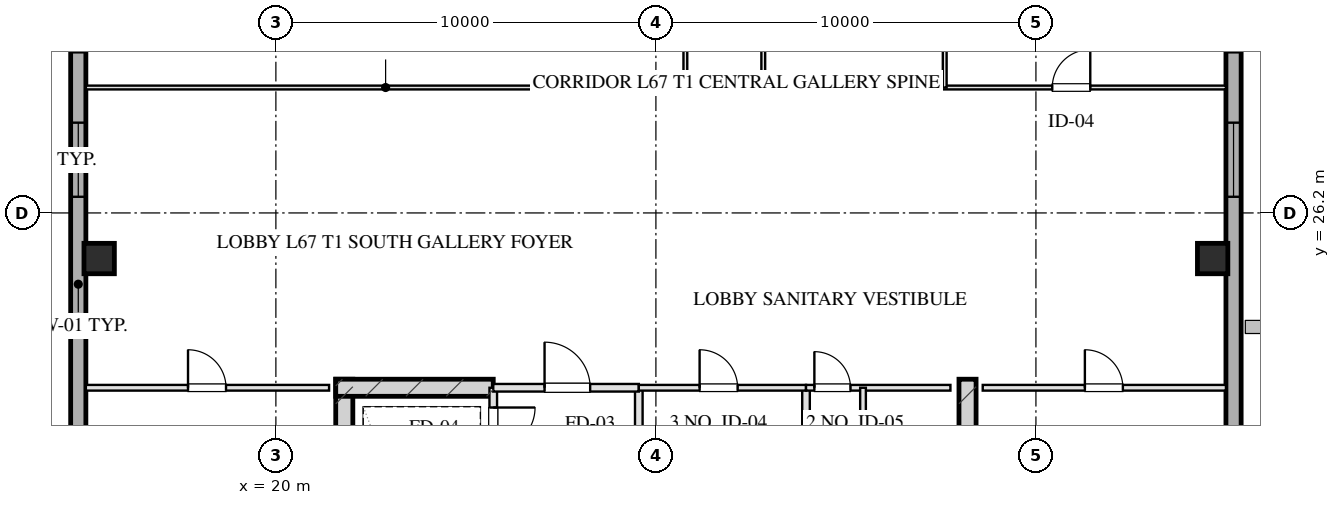
"""IFC4 building model, lengths in metres.
Left out: names, types, materials, properties, quantities, classifications, styles, units other than length and angle.
Written with IfcOpenShell. Run it as: python <this file> out.ifc"""

import sys

from ifc_helpers import new_model, si_unit, direction, frame, frame_2d, origin, origin_2d, place, context, subcontext, project, spatial, rectangle, hollow_rectangle, extrude, element, fill, save


model = new_model("IFC4")
c1 = context("Model", 3, precision=1e-05, world=origin(), true_north=direction((0.0, 1.0)))
c2 = subcontext(c1, "Body", "Model", "MODEL_VIEW")
j1 = project(units=[si_unit("LENGTHUNIT", "METRE"), si_unit("PLANEANGLEUNIT", "RADIAN")], contexts=[c1])
p1 = place(None, origin())
s1 = spatial("IfcSite", under=j1, at=p1, CompositionType="ELEMENT")
p2 = place(p1, origin())
s2 = spatial("IfcBuilding", under=s1, at=p2, CompositionType="ELEMENT")
p3 = place(p2, frame((0.0, 0.0, 247.2)))
s3 = spatial("IfcBuildingStorey", under=s2, at=p3, CompositionType="ELEMENT", Elevation=247.2)
for number, where, z_axis, x_axis in (
    (1, (21.8, 21.825, 0.0), (0.0, 0.0, 1.0), (0.0, -1.0, 0.0)),
    (2, (38.2, 21.825, 0.0), (0.0, 0.0, 1.0), (0.0, -1.0, 0.0)),
):
    element("IfcWall", number, at=place(p3, frame(where, z_axis=z_axis, x_axis=x_axis)), inside=s3, PredefinedType="SHEAR", context=c2, shape_type="SweptSolid", body=[
        extrude(rectangle(XDim=9.33, YDim=0.45, at=frame_2d((4.665, 0.0))), origin(), (0.0, 0.0, 1.0), 3.2),
    ])
p4 = place(p3, frame((21.575, 21.6, 0.0), z_axis=(0.0, 0.0, 1.0), x_axis=(1.0, 0.0, 0.0)))
e3 = element("IfcWall", 3, at=p4, inside=s3, PredefinedType="SHEAR", context=c2, shape_type="SweptSolid", body=[
    extrude(rectangle(XDim=4.145, YDim=0.45, at=frame_2d((2.073, 0.0))), origin(), (0.0, 0.0, 1.0), 3.2),
])
for number, where, z_axis, x_axis in (
    (4, (15.35, 25.0, 0.0), (0.0, 0.0, 1.0), (1.0, 0.0, 0.0)),
    (5, (44.65, 25.0, 0.0), (0.0, 0.0, 1.0), (1.0, 0.0, 0.0)),
):
    element("IfcColumn", number, at=place(p3, frame(where, z_axis=z_axis, x_axis=x_axis)), inside=s3, PredefinedType="COLUMN", context=c2, shape_type="SweptSolid", body=[
        extrude(hollow_rectangle(XDim=0.8, YDim=0.8, WallThickness=0.028, at=origin_2d()), origin(), (0.0, 0.0, 1.0), 3.201),
    ])
p5 = place(p3, frame((14.8, 13.1, 0.0), z_axis=(0.0, 0.0, 1.0), x_axis=(0.0, 1.0, 0.0)))
e6 = element("IfcWall", 6, at=p5, inside=s3, PredefinedType="SOLIDWALL", context=c2, shape_type="SweptSolid", body=[
    extrude(rectangle(XDim=41.8, YDim=0.4, at=frame_2d((20.9, 0.0))), origin(), (0.0, 0.0, 1.0), 2.36),
])
p6 = place(p5, frame((13.525, 0.0, 0.75)))
e7 = element("IfcOpeningElement", 7, at=p6, cuts=e6, PredefinedType="OPENING", context=c2, shape_type="SweptSolid", body=[
    extrude(rectangle(XDim=1.95, YDim=1.21, at=frame_2d((0.975, 0.605))), frame((0.0, 0.21, 0.0), z_axis=(0.0, -1.0, 0.0), x_axis=(1.0, 0.0, 0.0)), (0.0, 0.0, 1.0), 0.42),
])
p7 = place(p5, frame((17.325, 0.0, 0.75)))
e8 = element("IfcOpeningElement", 8, at=p7, cuts=e6, PredefinedType="OPENING", context=c2, shape_type="SweptSolid", body=[
    extrude(rectangle(XDim=1.95, YDim=1.21, at=frame_2d((0.975, 0.605))), frame((0.0, 0.21, 0.0), z_axis=(0.0, -1.0, 0.0), x_axis=(1.0, 0.0, 0.0)), (0.0, 0.0, 1.0), 0.42),
])
p8 = place(p5, frame((23.2, 0.0, 0.0)))
e9 = element("IfcOpeningElement", 9, at=p8, cuts=e6, PredefinedType="OPENING", context=c2, shape_type="SweptSolid", body=[
    extrude(rectangle(XDim=1.1, YDim=2.15, at=frame_2d((0.55, 1.075))), frame((0.0, 0.21, 0.0), z_axis=(0.0, -1.0, 0.0), x_axis=(1.0, 0.0, 0.0)), (0.0, 0.0, 1.0), 0.42),
])
p9 = place(p3, frame((45.2, 54.9, 0.0), z_axis=(0.0, 0.0, 1.0), x_axis=(0.0, -1.0, 0.0)))
e10 = element("IfcWall", 10, at=p9, inside=s3, PredefinedType="SOLIDWALL", context=c2, shape_type="SweptSolid", body=[
    extrude(rectangle(XDim=41.8, YDim=0.4, at=frame_2d((20.9, 0.0))), origin(), (0.0, 0.0, 1.0), 2.36),
])
p10 = place(p9, frame((26.325, 0.0, 0.75)))
e11 = element("IfcOpeningElement", 11, at=p10, cuts=e10, PredefinedType="OPENING", context=c2, shape_type="SweptSolid", body=[
    extrude(rectangle(XDim=1.95, YDim=1.21, at=frame_2d((0.975, 0.605))), frame((0.0, 0.21, 0.0), z_axis=(0.0, -1.0, 0.0), x_axis=(1.0, 0.0, 0.0)), (0.0, 0.0, 1.0), 0.42),
])
p11 = place(p9, frame((22.525, 0.0, 0.75)))
e12 = element("IfcOpeningElement", 12, at=p11, cuts=e10, PredefinedType="OPENING", context=c2, shape_type="SweptSolid", body=[
    extrude(rectangle(XDim=1.95, YDim=1.21, at=frame_2d((0.975, 0.605))), frame((0.0, 0.21, 0.0), z_axis=(0.0, -1.0, 0.0), x_axis=(1.0, 0.0, 0.0)), (0.0, 0.0, 1.0), 0.42),
])
p12 = place(p9, frame((17.5, 0.0, 0.0)))
e13 = element("IfcOpeningElement", 13, at=p12, cuts=e10, PredefinedType="OPENING", context=c2, shape_type="SweptSolid", body=[
    extrude(rectangle(XDim=1.1, YDim=2.15, at=frame_2d((0.55, 1.075))), frame((0.0, 0.21, 0.0), z_axis=(0.0, -1.0, 0.0), x_axis=(1.0, 0.0, 0.0)), (0.0, 0.0, 1.0), 0.42),
])
p13 = place(p3, frame((25.72, 21.6, 0.0), z_axis=(0.0, 0.0, 1.0), x_axis=(0.0, -1.0, 0.0)))
e14 = element("IfcWall", 14, at=p13, inside=s3, PredefinedType="PARTITIONING", context=c2, shape_type="SweptSolid", body=[
    extrude(rectangle(XDim=1.9, YDim=0.2, at=frame_2d((0.95, 0.0))), origin(), (0.0, 0.0, 1.0), 2.925),
])
p14 = place(p13, frame((0.52, 0.0, 0.0)))
e15 = element("IfcOpeningElement", 15, at=p14, cuts=e14, PredefinedType="OPENING", context=c2, shape_type="SweptSolid", body=[
    extrude(rectangle(XDim=1.1, YDim=2.05, at=frame_2d((0.55, 1.025))), frame((0.0, 0.11, 0.0), z_axis=(0.0, -1.0, 0.0), x_axis=(1.0, 0.0, 0.0)), (0.0, 0.0, 1.0), 0.22),
])
p15 = place(p3, frame((29.55, 21.6, 0.0), z_axis=(0.0, 0.0, 1.0), x_axis=(0.0, -1.0, 0.0)))
e16 = element("IfcWall", 16, at=p15, inside=s3, PredefinedType="PARTITIONING", context=c2, shape_type="SweptSolid", body=[
    extrude(rectangle(XDim=8.43, YDim=0.2, at=frame_2d((4.215, 0.0))), origin(), (0.0, 0.0, 1.0), 2.925),
])
p16 = place(p3, frame((25.72, 21.6, 0.0), z_axis=(0.0, 0.0, 1.0), x_axis=(1.0, 0.0, 0.0)))
e17 = element("IfcWall", 17, at=p16, inside=s3, PredefinedType="PARTITIONING", context=c2, shape_type="SweptSolid", body=[
    extrude(rectangle(XDim=3.83, YDim=0.2, at=frame_2d((1.915, 0.0))), origin(), (0.0, 0.0, 1.0), 2.925),
])
p17 = place(p16, frame((1.35, 0.0, 0.0)))
e18 = element("IfcOpeningElement", 18, at=p17, cuts=e17, PredefinedType="OPENING", context=c2, shape_type="SweptSolid", body=[
    extrude(rectangle(XDim=1.2, YDim=2.05, at=frame_2d((0.6, 1.025))), frame((0.0, 0.11, 0.0), z_axis=(0.0, -1.0, 0.0), x_axis=(1.0, 0.0, 0.0)), (0.0, 0.0, 1.0), 0.22),
])
p18 = place(p3, frame((33.95, 21.6, 0.0), z_axis=(0.0, 0.0, 1.0), x_axis=(0.0, -1.0, 0.0)))
e19 = element("IfcWall", 19, at=p18, inside=s3, PredefinedType="PARTITIONING", context=c2, shape_type="SweptSolid", body=[
    extrude(rectangle(XDim=8.43, YDim=0.2, at=frame_2d((4.215, 0.0))), origin(), (0.0, 0.0, 1.0), 2.925),
])
p19 = place(p3, frame((29.55, 21.6, 0.0), z_axis=(0.0, 0.0, 1.0), x_axis=(1.0, 0.0, 0.0)))
e20 = element("IfcWall", 20, at=p19, inside=s3, PredefinedType="PARTITIONING", context=c2, shape_type="SweptSolid", body=[
    extrude(rectangle(XDim=4.4, YDim=0.15, at=frame_2d((2.2, 0.0))), origin(), (0.0, 0.0, 1.0), 2.925),
])
p20 = place(p19, frame((1.6, 0.0, 0.0)))
e21 = element("IfcOpeningElement", 21, at=p20, cuts=e20, PredefinedType="OPENING", context=c2, shape_type="SweptSolid", body=[
    extrude(rectangle(XDim=1.0, YDim=2.05, at=frame_2d((0.5, 1.025))), frame((0.0, 0.085, 0.0), z_axis=(0.0, -1.0, 0.0), x_axis=(1.0, 0.0, 0.0)), (0.0, 0.0, 1.0), 0.17),
])
p21 = place(p3, frame((33.95, 21.6, 0.0), z_axis=(0.0, 0.0, 1.0), x_axis=(1.0, 0.0, 0.0)))
e22 = element("IfcWall", 22, at=p21, inside=s3, PredefinedType="PARTITIONING", context=c2, shape_type="SweptSolid", body=[
    extrude(rectangle(XDim=3.8, YDim=0.15, at=frame_2d((1.9, 0.0))), origin(), (0.0, 0.0, 1.0), 2.925),
])
p22 = place(p21, frame((0.22, 0.0, 0.0)))
e23 = element("IfcOpeningElement", 23, at=p22, cuts=e22, PredefinedType="OPENING", context=c2, shape_type="SweptSolid", body=[
    extrude(rectangle(XDim=0.95, YDim=2.05, at=frame_2d((0.475, 1.025))), frame((0.0, 0.085, 0.0), z_axis=(0.0, -1.0, 0.0), x_axis=(1.0, 0.0, 0.0)), (0.0, 0.0, 1.0), 0.17),
])
p23 = place(p3, frame((35.45, 21.6, 0.0), z_axis=(0.0, 0.0, 1.0), x_axis=(0.0, -1.0, 0.0)))
e24 = element("IfcWall", 24, at=p23, inside=s3, PredefinedType="PARTITIONING", context=c2, shape_type="SweptSolid", body=[
    extrude(rectangle(XDim=8.43, YDim=0.15, at=frame_2d((4.215, 0.0))), origin(), (0.0, 0.0, 1.0), 2.565),
])
p24 = place(p23, frame((2.55, 0.0, 0.0)))
e25 = element("IfcOpeningElement", 25, at=p24, cuts=e24, PredefinedType="OPENING", context=c2, shape_type="SweptSolid", body=[
    extrude(rectangle(XDim=0.95, YDim=2.05, at=frame_2d((0.475, 1.025))), frame((0.0, 0.085, 0.0), z_axis=(0.0, -1.0, 0.0), x_axis=(1.0, 0.0, 0.0)), (0.0, 0.0, 1.0), 0.17),
])
p25 = place(p23, frame((4.7, 0.0, 0.0)))
e26 = element("IfcOpeningElement", 26, at=p25, cuts=e24, PredefinedType="OPENING", context=c2, shape_type="SweptSolid", body=[
    extrude(rectangle(XDim=0.9, YDim=2.05, at=frame_2d((0.45, 1.025))), frame((0.0, 0.085, 0.0), z_axis=(0.0, -1.0, 0.0), x_axis=(1.0, 0.0, 0.0)), (0.0, 0.0, 1.0), 0.17),
])
p26 = place(p23, frame((6.8, 0.0, 0.0)))
e27 = element("IfcOpeningElement", 27, at=p26, cuts=e24, PredefinedType="OPENING", context=c2, shape_type="SweptSolid", body=[
    extrude(rectangle(XDim=0.9, YDim=2.05, at=frame_2d((0.45, 1.025))), frame((0.0, 0.085, 0.0), z_axis=(0.0, -1.0, 0.0), x_axis=(1.0, 0.0, 0.0)), (0.0, 0.0, 1.0), 0.17),
])
p27 = place(p3, frame((15.0, 21.6, 0.0), z_axis=(0.0, 0.0, 1.0), x_axis=(1.0, 0.0, 0.0)))
e28 = element("IfcWall", 28, at=p27, inside=s3, PredefinedType="PARTITIONING", context=c2, shape_type="SweptSolid", body=[
    extrude(rectangle(XDim=6.4, YDim=0.15, at=frame_2d((3.2, 0.0))), origin(), (0.0, 0.0, 1.0), 2.925),
])
p28 = place(p27, frame((2.688, 0.0, 0.0)))
e29 = element("IfcOpeningElement", 29, at=p28, cuts=e28, PredefinedType="OPENING", context=c2, shape_type="SweptSolid", body=[
    extrude(rectangle(XDim=1.0, YDim=2.05, at=frame_2d((0.5, 1.025))), frame((0.0, 0.085, 0.0), z_axis=(0.0, -1.0, 0.0), x_axis=(1.0, 0.0, 0.0)), (0.0, 0.0, 1.0), 0.17),
])
p29 = place(p3, frame((38.6, 21.6, 0.0), z_axis=(0.0, 0.0, 1.0), x_axis=(1.0, 0.0, 0.0)))
e30 = element("IfcWall", 30, at=p29, inside=s3, PredefinedType="PARTITIONING", context=c2, shape_type="SweptSolid", body=[
    extrude(rectangle(XDim=6.4, YDim=0.15, at=frame_2d((3.2, 0.0))), origin(), (0.0, 0.0, 1.0), 2.925),
])
p30 = place(p29, frame((2.688, 0.0, 0.0)))
e31 = element("IfcOpeningElement", 31, at=p30, cuts=e30, PredefinedType="OPENING", context=c2, shape_type="SweptSolid", body=[
    extrude(rectangle(XDim=1.0, YDim=2.05, at=frame_2d((0.5, 1.025))), frame((0.0, 0.085, 0.0), z_axis=(0.0, -1.0, 0.0), x_axis=(1.0, 0.0, 0.0)), (0.0, 0.0, 1.0), 0.17),
])
p31 = place(p3, frame((15.0, 29.5, 0.0), z_axis=(0.0, 0.0, 1.0), x_axis=(1.0, 0.0, 0.0)))
e32 = element("IfcWall", 32, at=p31, inside=s3, PredefinedType="MOVABLE", context=c2, shape_type="SweptSolid", body=[
    extrude(rectangle(XDim=15.775, YDim=0.1, at=frame_2d((7.887, 0.0))), origin(), (0.0, 0.0, 1.0), 2.925),
])
p32 = place(p3, frame((32.825, 29.5, 0.0), z_axis=(0.0, 0.0, 1.0), x_axis=(1.0, 0.0, 0.0)))
e33 = element("IfcWall", 33, at=p32, inside=s3, PredefinedType="MOVABLE", context=c2, shape_type="SweptSolid", body=[
    extrude(rectangle(XDim=12.175, YDim=0.1, at=frame_2d((6.087, 0.0))), origin(), (0.0, 0.0, 1.0), 2.925),
])
p33 = place(p32, frame((7.605, 0.0, 0.0)))
e34 = element("IfcOpeningElement", 34, at=p33, cuts=e33, PredefinedType="OPENING", context=c2, shape_type="SweptSolid", body=[
    extrude(rectangle(XDim=1.0, YDim=2.05, at=frame_2d((0.5, 1.025))), frame((0.0, 0.06, 0.0), z_axis=(0.0, -1.0, 0.0), x_axis=(1.0, 0.0, 0.0)), (0.0, 0.0, 1.0), 0.12),
])
p34 = place(p3, frame((30.775, 29.5, 0.0), z_axis=(0.0, 0.0, 1.0), x_axis=(0.0, 1.0, 0.0)))
e35 = element("IfcWall", 35, at=p34, inside=s3, PredefinedType="MOVABLE", context=c2, shape_type="SweptSolid", body=[
    extrude(rectangle(XDim=9.0, YDim=0.1, at=frame_2d((4.5, 0.0))), origin(), (0.0, 0.0, 1.0), 2.925),
])
p35 = place(p34, frame((1.2, 0.0, 0.0)))
e36 = element("IfcOpeningElement", 36, at=p35, cuts=e35, PredefinedType="OPENING", context=c2, shape_type="SweptSolid", body=[
    extrude(rectangle(XDim=1.05, YDim=2.05, at=frame_2d((0.525, 1.025))), frame((0.0, 0.06, 0.0), z_axis=(0.0, -1.0, 0.0), x_axis=(1.0, 0.0, 0.0)), (0.0, 0.0, 1.0), 0.12),
])
p36 = place(p34, frame((4.035, 0.0, 0.0)))
e37 = element("IfcOpeningElement", 37, at=p36, cuts=e35, PredefinedType="OPENING", context=c2, shape_type="SweptSolid", body=[
    extrude(rectangle(XDim=1.0, YDim=2.05, at=frame_2d((0.5, 1.025))), frame((0.0, 0.06, 0.0), z_axis=(0.0, -1.0, 0.0), x_axis=(1.0, 0.0, 0.0)), (0.0, 0.0, 1.0), 0.12),
])
p37 = place(p34, frame((6.835, 0.0, 0.0)))
e38 = element("IfcOpeningElement", 38, at=p37, cuts=e35, PredefinedType="OPENING", context=c2, shape_type="SweptSolid", body=[
    extrude(rectangle(XDim=1.0, YDim=2.05, at=frame_2d((0.5, 1.025))), frame((0.0, 0.06, 0.0), z_axis=(0.0, -1.0, 0.0), x_axis=(1.0, 0.0, 0.0)), (0.0, 0.0, 1.0), 0.12),
])
p38 = place(p3, frame((32.825, 29.5, 0.0), z_axis=(0.0, 0.0, 1.0), x_axis=(0.0, 1.0, 0.0)))
e39 = element("IfcWall", 39, at=p38, inside=s3, PredefinedType="MOVABLE", context=c2, shape_type="SweptSolid", body=[
    extrude(rectangle(XDim=9.0, YDim=0.1, at=frame_2d((4.5, 0.0))), origin(), (0.0, 0.0, 1.0), 2.925),
])
p39 = place(p38, frame((4.0, 0.0, 0.0)))
e40 = element("IfcOpeningElement", 40, at=p39, cuts=e39, PredefinedType="OPENING", context=c2, shape_type="SweptSolid", body=[
    extrude(rectangle(XDim=1.0, YDim=2.05, at=frame_2d((0.5, 1.025))), frame((0.0, 0.06, 0.0), z_axis=(0.0, -1.0, 0.0), x_axis=(1.0, 0.0, 0.0)), (0.0, 0.0, 1.0), 0.12),
])
p40 = place(p3, frame((37.6, 29.5, 0.0), z_axis=(0.0, 0.0, 1.0), x_axis=(0.0, 1.0, 0.0)))
e41 = element("IfcWall", 41, at=p40, inside=s3, PredefinedType="MOVABLE", context=c2, shape_type="SweptSolid", body=[
    extrude(rectangle(XDim=9.0, YDim=0.1, at=frame_2d((4.5, 0.0))), origin(), (0.0, 0.0, 1.0), 2.925),
])
p41 = place(p6, origin())
e42 = element("IfcWindow", 42, at=p41, inside=s3, PartitioningType="TRIPLE_PANEL_VERTICAL", PredefinedType="WINDOW", context=c2, shape_type="SweptSolid", body=[
    extrude(rectangle(XDim=1.95, YDim=1.21, at=frame_2d((0.975, 0.605))), frame((0.0, 0.03, 0.0), z_axis=(0.0, -1.0, 0.0), x_axis=(1.0, 0.0, 0.0)), (0.0, 0.0, 1.0), 0.06),
])
fill(e7, e42)
p42 = place(p10, origin())
e43 = element("IfcWindow", 43, at=p42, inside=s3, PartitioningType="TRIPLE_PANEL_VERTICAL", PredefinedType="WINDOW", context=c2, shape_type="SweptSolid", body=[
    extrude(rectangle(XDim=1.95, YDim=1.21, at=frame_2d((0.975, 0.605))), frame((0.0, 0.03, 0.0), z_axis=(0.0, -1.0, 0.0), x_axis=(1.0, 0.0, 0.0)), (0.0, 0.0, 1.0), 0.06),
])
fill(e11, e43)
p43 = place(p14, origin())
e44 = element("IfcDoor", 44, at=p43, inside=s3, OperationType="SINGLE_SWING_LEFT", PredefinedType="DOOR", context=c2, shape_type="SweptSolid", body=[
    extrude(rectangle(XDim=1.1, YDim=2.05, at=frame_2d((0.55, 1.025))), frame((0.0, 0.025, 0.0), z_axis=(0.0, -1.0, 0.0), x_axis=(1.0, 0.0, 0.0)), (0.0, 0.0, 1.0), 0.05),
])
fill(e15, e44)
p44 = place(p17, origin())
e45 = element("IfcDoor", 45, at=p44, inside=s3, OperationType="SINGLE_SWING_LEFT", PredefinedType="DOOR", context=c2, shape_type="SweptSolid", body=[
    extrude(rectangle(XDim=1.2, YDim=2.05, at=frame_2d((0.6, 1.025))), frame((0.0, 0.025, 0.0), z_axis=(0.0, -1.0, 0.0), x_axis=(1.0, 0.0, 0.0)), (0.0, 0.0, 1.0), 0.05),
])
fill(e18, e45)
p45 = place(p20, origin())
e46 = element("IfcDoor", 46, at=p45, inside=s3, OperationType="SINGLE_SWING_LEFT", PredefinedType="DOOR", context=c2, shape_type="SweptSolid", body=[
    extrude(rectangle(XDim=1.0, YDim=2.05, at=frame_2d((0.5, 1.025))), frame((0.0, 0.025, 0.0), z_axis=(0.0, -1.0, 0.0), x_axis=(1.0, 0.0, 0.0)), (0.0, 0.0, 1.0), 0.05),
])
fill(e21, e46)
p46 = place(p22, origin())
e47 = element("IfcDoor", 47, at=p46, inside=s3, OperationType="SINGLE_SWING_LEFT", PredefinedType="DOOR", context=c2, shape_type="SweptSolid", body=[
    extrude(rectangle(XDim=0.95, YDim=2.05, at=frame_2d((0.475, 1.025))), frame((0.0, 0.025, 0.0), z_axis=(0.0, -1.0, 0.0), x_axis=(1.0, 0.0, 0.0)), (0.0, 0.0, 1.0), 0.05),
])
fill(e23, e47)
p47 = place(p28, origin())
e48 = element("IfcDoor", 48, at=p47, inside=s3, OperationType="SINGLE_SWING_LEFT", PredefinedType="DOOR", context=c2, shape_type="SweptSolid", body=[
    extrude(rectangle(XDim=1.0, YDim=2.05, at=frame_2d((0.5, 1.025))), frame((0.0, 0.025, 0.0), z_axis=(0.0, -1.0, 0.0), x_axis=(1.0, 0.0, 0.0)), (0.0, 0.0, 1.0), 0.05),
])
fill(e29, e48)
p48 = place(p30, origin())
e49 = element("IfcDoor", 49, at=p48, inside=s3, OperationType="SINGLE_SWING_LEFT", PredefinedType="DOOR", context=c2, shape_type="SweptSolid", body=[
    extrude(rectangle(XDim=1.0, YDim=2.05, at=frame_2d((0.5, 1.025))), frame((0.0, 0.025, 0.0), z_axis=(0.0, -1.0, 0.0), x_axis=(1.0, 0.0, 0.0)), (0.0, 0.0, 1.0), 0.05),
])
fill(e31, e49)
p49 = place(p33, origin())
e50 = element("IfcDoor", 50, at=p49, inside=s3, OperationType="SINGLE_SWING_RIGHT", PredefinedType="DOOR", context=c2, shape_type="SweptSolid", body=[
    extrude(rectangle(XDim=1.0, YDim=2.05, at=frame_2d((0.5, 1.025))), frame((0.0, 0.025, 0.0), z_axis=(0.0, -1.0, 0.0), x_axis=(1.0, 0.0, 0.0)), (0.0, 0.0, 1.0), 0.05),
])
fill(e34, e50)
save(model, sys.argv[1])
